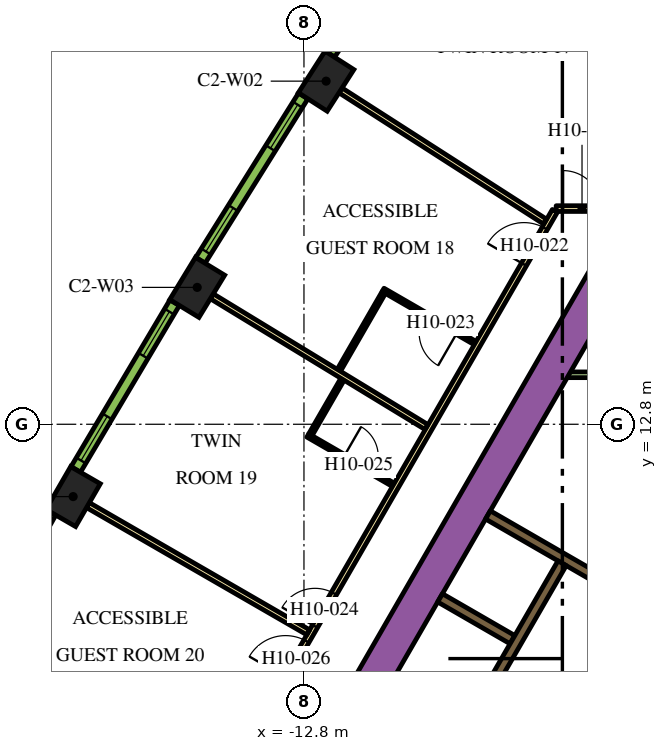
"""IFC4 building model, lengths in metres.
Left out: names, types, materials, properties, quantities, classifications, styles, units other than length and angle.
Written with IfcOpenShell. Run it as: python <this file> out.ifc"""

import sys

from ifc_helpers import new_model, si_unit, direction, frame, frame_2d, origin, origin_2d, place, context, subcontext, project, spatial, rectangle, extrude, element, fill, save


model = new_model("IFC4")
c1 = context("Model", 3, precision=1e-05, world=origin(), true_north=direction((0.0, 1.0)))
c2 = subcontext(c1, "Body", "Model", "MODEL_VIEW")
j1 = project(units=[si_unit("LENGTHUNIT", "METRE"), si_unit("PLANEANGLEUNIT", "RADIAN")], contexts=[c1])
p1 = place(None, origin())
s1 = spatial("IfcSite", under=j1, at=p1, CompositionType="ELEMENT")
p2 = place(p1, origin())
s2 = spatial("IfcBuilding", under=s1, at=p2, CompositionType="ELEMENT")
p3 = place(p2, frame((0.0, 0.0, 130.5)))
s3 = spatial("IfcBuildingStorey", under=s2, at=p3, CompositionType="ELEMENT", Elevation=130.5)
for number, where, z_axis, x_axis in (
    (1, (-12.217, 21.828, 0.0), (0.0, 0.0, 1.0), (-0.54, -0.842, 0.0)),
    (2, (-15.609, 16.402, 0.0), (0.0, 0.0, 1.0), (-0.52, -0.854, 0.0)),
    (3, (-18.874, 10.897, 0.0), (0.0, 0.0, 1.0), (-0.5, -0.866, 0.0)),
):
    element("IfcColumn", number, at=place(p3, frame(where, z_axis=z_axis, x_axis=x_axis)), inside=s3, PredefinedType="COLUMN", context=c2, shape_type="SweptSolid", body=[
        extrude(rectangle(XDim=1.3, YDim=0.9, at=origin_2d()), origin(), (0.0, 0.0, 1.0), 3.9),
    ])
p4 = place(p3, frame((-14.268, 0.387, 0.0), z_axis=(0.0, 0.0, 1.0), x_axis=(0.499994617707, 0.866028511231, 0.0)))
e4 = element("IfcWall", 4, at=p4, inside=s3, PredefinedType="SOLIDWALL", context=c2, shape_type="SweptSolid", body=[
    extrude(rectangle(XDim=18.817, YDim=0.9, at=frame_2d((9.409, 0.0))), origin(), (0.0, 0.0, 1.0), 3.9),
])
p5 = place(p3, frame((-8.06, -1.311, 0.0), z_axis=(0.0, 0.0, 1.0), x_axis=(0.50000273126, 0.866023826885, 0.0)))
e5 = element("IfcWall", 5, at=p5, inside=s3, PredefinedType="SOLIDWALL", context=c2, shape_type="SweptSolid", body=[
    extrude(rectangle(XDim=10.33, YDim=0.25, at=frame_2d((5.165, 0.0))), origin(), (0.0, 0.0, 1.0), 3.9),
])
p6 = place(p3, frame((-7.314, 7.132, 0.0), z_axis=(0.0, 0.0, 1.0), x_axis=(-0.866008176907, 0.50002983664, 0.0)))
e6 = element("IfcWall", 6, at=p6, inside=s3, PredefinedType="SOLIDWALL", context=c2, shape_type="SweptSolid", body=[
    extrude(rectangle(XDim=2.2, YDim=0.25, at=frame_2d((1.1, 0.0))), origin(), (0.0, 0.0, 1.0), 3.9),
])
p7 = place(p3, frame((-7.959, 10.415, 0.0), z_axis=(0.0, 0.0, 1.0), x_axis=(0.866020958405, -0.500007699544, 0.0)))
e7 = element("IfcWall", 7, at=p7, inside=s3, PredefinedType="SOLIDWALL", context=c2, shape_type="SweptSolid", body=[
    extrude(rectangle(XDim=4.1, YDim=0.25, at=frame_2d((2.05, 0.0))), origin(), (0.0, 0.0, 1.0), 3.9),
])
p8 = place(p3, frame((-5.851, 14.102, 0.0), z_axis=(0.0, 0.0, 1.0), x_axis=(1.0, 0.0, 0.0)))
e8 = element("IfcWall", 8, at=p8, inside=s3, PredefinedType="PARTITIONING", context=c2, shape_type="SweptSolid", body=[
    extrude(rectangle(XDim=1.18, YDim=0.15, at=frame_2d((0.59, 0.0))), origin(), (0.0, 0.0, 1.0), 2.6),
])
p9 = place(p3, frame((-6.008, 9.144, 0.0), z_axis=(0.0, 0.0, 1.0), x_axis=(-0.500006956611, -0.866021387346, 0.0)))
e9 = element("IfcWall", 9, at=p9, inside=s3, PredefinedType="SOLIDWALL", context=c2, shape_type="SweptSolid", body=[
    extrude(rectangle(XDim=9.83, YDim=0.25, at=frame_2d((4.915, 0.0))), origin(), (0.0, 0.0, 1.0), 3.9),
])
p10 = place(p9, frame((6.985, 0.0, 0.0)))
e10 = element("IfcOpeningElement", 10, at=p10, cuts=e9, PredefinedType="OPENING", context=c2, shape_type="SweptSolid", body=[
    extrude(rectangle(XDim=0.9, YDim=2.1, at=frame_2d((0.45, 1.05))), frame((0.0, 0.135, 0.0), z_axis=(0.0, -1.0, 0.0), x_axis=(1.0, 0.0, 0.0)), (0.0, 0.0, 1.0), 0.27),
])
p11 = place(p3, frame((-6.163, 18.475, 0.0), z_axis=(0.0, 0.0, 1.0), x_axis=(1.0, 0.0, 0.0)))
e11 = element("IfcWall", 11, at=p11, inside=s3, PredefinedType="PARTITIONING", context=c2, shape_type="SweptSolid", body=[
    extrude(rectangle(XDim=5.258, YDim=0.15, at=frame_2d((2.629, 0.0))), origin(), (0.0, 0.0, 1.0), 2.6),
])
p12 = place(p11, frame((0.18, 0.0, 0.0)))
e12 = element("IfcOpeningElement", 12, at=p12, cuts=e11, PredefinedType="OPENING", context=c2, shape_type="SweptSolid", body=[
    extrude(rectangle(XDim=1.0, YDim=2.1, at=frame_2d((0.5, 1.05))), frame((0.0, 0.085, 0.0), z_axis=(0.0, -1.0, 0.0), x_axis=(1.0, 0.0, 0.0)), (0.0, 0.0, 1.0), 0.17),
])
p13 = place(p3, frame((-19.081, -3.9, 0.0), z_axis=(0.0, 0.0, 1.0), x_axis=(0.499998313975, 0.866026377209, 0.0)))
e13 = element("IfcWall", 13, at=p13, inside=s3, PredefinedType="PARTITIONING", context=c2, shape_type="SweptSolid", body=[
    extrude(rectangle(XDim=25.766, YDim=0.15, at=frame_2d((12.883, 0.0))), origin(), (0.0, 0.0, 1.0), 2.6),
])
p14 = place(p13, frame((24.141, 0.0, 0.0)))
e14 = element("IfcOpeningElement", 14, at=p14, cuts=e13, PredefinedType="OPENING", context=c2, shape_type="SweptSolid", body=[
    extrude(rectangle(XDim=1.1, YDim=2.1, at=frame_2d((0.55, 1.05))), frame((0.0, 0.085, 0.0), z_axis=(0.0, -1.0, 0.0), x_axis=(1.0, 0.0, 0.0)), (0.0, 0.0, 1.0), 0.17),
])
p15 = place(p13, frame((13.144, 0.0, 0.0)))
e15 = element("IfcOpeningElement", 15, at=p15, cuts=e13, PredefinedType="OPENING", context=c2, shape_type="SweptSolid", body=[
    extrude(rectangle(XDim=1.0, YDim=2.1, at=frame_2d((0.5, 1.05))), frame((0.0, 0.085, 0.0), z_axis=(0.0, -1.0, 0.0), x_axis=(1.0, 0.0, 0.0)), (0.0, 0.0, 1.0), 0.17),
])
p16 = place(p13, frame((11.593, 0.0, 0.0)))
e16 = element("IfcOpeningElement", 16, at=p16, cuts=e13, PredefinedType="OPENING", context=c2, shape_type="SweptSolid", body=[
    extrude(rectangle(XDim=1.1, YDim=2.1, at=frame_2d((0.55, 1.05))), frame((0.0, 0.085, 0.0), z_axis=(0.0, -1.0, 0.0), x_axis=(1.0, 0.0, 0.0)), (0.0, 0.0, 1.0), 0.17),
])
p17 = place(p13, frame((0.596, 0.0, 0.0)))
e17 = element("IfcOpeningElement", 17, at=p17, cuts=e13, PredefinedType="OPENING", context=c2, shape_type="SweptSolid", body=[
    extrude(rectangle(XDim=1.0, YDim=2.1, at=frame_2d((0.5, 1.05))), frame((0.0, 0.085, 0.0), z_axis=(0.0, -1.0, 0.0), x_axis=(1.0, 0.0, 0.0)), (0.0, 0.0, 1.0), 0.17),
])
p18 = place(p3, frame((-18.484, 10.672, 0.0), z_axis=(0.0, 0.0, 1.0), x_axis=(0.866019162053, -0.50001081084, 0.0)))
e18 = element("IfcWall", 18, at=p18, inside=s3, PredefinedType="PARTITIONING", context=c2, shape_type="SweptSolid", body=[
    extrude(rectangle(XDim=6.694, YDim=0.15, at=frame_2d((3.347, 0.0))), origin(), (0.0, 0.0, 1.0), 2.6),
])
p19 = place(p3, frame((-15.225, 16.167, 0.0), z_axis=(0.0, 0.0, 1.0), x_axis=(0.854088713274, -0.520127359266, 0.0)))
e19 = element("IfcWall", 19, at=p19, inside=s3, PredefinedType="PARTITIONING", context=c2, shape_type="SweptSolid", body=[
    extrude(rectangle(XDim=6.611, YDim=0.15, at=frame_2d((3.305, 0.0))), origin(), (0.0, 0.0, 1.0), 2.6),
])
p20 = place(p3, frame((-11.838, 21.585, 0.0), z_axis=(0.0, 0.0, 1.0), x_axis=(0.841699322813, -0.539946525108, 0.0)))
e20 = element("IfcWall", 20, at=p20, inside=s3, PredefinedType="PARTITIONING", context=c2, shape_type="SweptSolid", body=[
    extrude(rectangle(XDim=6.392, YDim=0.15, at=frame_2d((3.196, 0.0))), origin(), (0.0, 0.0, 1.0), 2.6),
])
p21 = place(p3, frame((-8.326, 26.923, 0.0), z_axis=(0.0, 0.0, 1.0), x_axis=(0.828836601893, -0.5594907393, 0.0)))
e21 = element("IfcWall", 21, at=p21, inside=s3, PredefinedType="PARTITIONING", context=c2, shape_type="SweptSolid", body=[
    extrude(rectangle(XDim=8.909, YDim=0.15, at=frame_2d((4.455, 0.0))), origin(), (0.0, 0.0, 1.0), 2.6),
])
p22 = place(p3, frame((-8.293, 14.936, 0.0), z_axis=(0.0, 0.0, 1.0), x_axis=(-0.866034573852, 0.49998411664, 0.0)))
e22 = element("IfcWall", 22, at=p22, inside=s3, PredefinedType="PARTITIONING", context=c2, shape_type="SweptSolid", body=[
    extrude(rectangle(XDim=2.8, YDim=0.1, at=frame_2d((1.4, 0.0))), origin(), (0.0, 0.0, 1.0), 2.6),
])
p23 = place(p22, frame((0.55, 0.0, 0.0)))
e23 = element("IfcOpeningElement", 23, at=p23, cuts=e22, PredefinedType="OPENING", context=c2, shape_type="SweptSolid", body=[
    extrude(rectangle(XDim=1.0, YDim=2.1, at=frame_2d((0.5, 1.05))), frame((0.0, 0.06, 0.0), z_axis=(0.0, -1.0, 0.0), x_axis=(1.0, 0.0, 0.0)), (0.0, 0.0, 1.0), 0.12),
])
p24 = place(p3, frame((-10.7, 16.267, 0.0), z_axis=(0.0, 0.0, 1.0), x_axis=(-0.500032858622, -0.866006432019, 0.0)))
e24 = element("IfcWall", 24, at=p24, inside=s3, PredefinedType="PARTITIONING", context=c2, shape_type="SweptSolid", body=[
    extrude(rectangle(XDim=2.36, YDim=0.1, at=frame_2d((1.18, 0.0))), origin(), (0.0, 0.0, 1.0), 2.6),
])
p25 = place(p3, frame((-12.698, 12.506, 0.0), z_axis=(0.0, 0.0, 1.0), x_axis=(0.865997922154, -0.500047596559, 0.0)))
e25 = element("IfcWall", 25, at=p25, inside=s3, PredefinedType="PARTITIONING", context=c2, shape_type="SweptSolid", body=[
    extrude(rectangle(XDim=2.6, YDim=0.1, at=frame_2d((1.3, 0.0))), origin(), (0.0, 0.0, 1.0), 2.6),
])
p26 = place(p25, frame((1.1, 0.0, 0.0)))
e26 = element("IfcOpeningElement", 26, at=p26, cuts=e25, PredefinedType="OPENING", context=c2, shape_type="SweptSolid", body=[
    extrude(rectangle(XDim=0.9, YDim=2.1, at=frame_2d((0.45, 1.05))), frame((0.0, 0.06, 0.0), z_axis=(0.0, -1.0, 0.0), x_axis=(1.0, 0.0, 0.0)), (0.0, 0.0, 1.0), 0.12),
])
p27 = place(p3, frame((-12.63, 12.524, 0.0), z_axis=(0.0, 0.0, 1.0), x_axis=(0.499953100966, 0.866052479261, 0.0)))
e27 = element("IfcWall", 27, at=p27, inside=s3, PredefinedType="PARTITIONING", context=c2, shape_type="SweptSolid", body=[
    extrude(rectangle(XDim=1.68, YDim=0.1, at=frame_2d((0.84, 0.0))), origin(), (0.0, 0.0, 1.0), 2.6),
])
p28 = place(p3, frame((-9.311, 26.799, 0.0), z_axis=(0.0, 0.0, 1.0), x_axis=(-0.549741341923, -0.835334937005, 0.0)))
e28 = element("IfcWall", 28, at=p28, inside=s3, PredefinedType="SOLIDWALL", context=c2, shape_type="SweptSolid", body=[
    extrude(rectangle(XDim=5.1, YDim=0.29, at=frame_2d((2.55, 0.0))), origin(), (0.0, 0.0, 1.0), 3.5),
])
p29 = place(p28, frame((0.273, 0.0, 0.9)))
e29 = element("IfcOpeningElement", 29, at=p29, cuts=e28, PredefinedType="OPENING", context=c2, shape_type="SweptSolid", body=[
    extrude(rectangle(XDim=1.35, YDim=2.15, at=frame_2d((0.675, 1.075))), frame((0.0, 0.155, 0.0), z_axis=(0.0, -1.0, 0.0), x_axis=(1.0, 0.0, 0.0)), (0.0, 0.0, 1.0), 0.31),
])
p30 = place(p28, frame((3.478, 0.0, 0.9)))
e30 = element("IfcOpeningElement", 30, at=p30, cuts=e28, PredefinedType="OPENING", context=c2, shape_type="SweptSolid", body=[
    extrude(rectangle(XDim=1.35, YDim=2.15, at=frame_2d((0.675, 1.075))), frame((0.0, 0.155, 0.0), z_axis=(0.0, -1.0, 0.0), x_axis=(1.0, 0.0, 0.0)), (0.0, 0.0, 1.0), 0.31),
])
p31 = place(p3, frame((-12.82, 21.439, 0.0), z_axis=(0.0, 0.0, 1.0), x_axis=(-0.530072082134, -0.847952585787, 0.0)))
e31 = element("IfcWall", 31, at=p31, inside=s3, PredefinedType="SOLIDWALL", context=c2, shape_type="SweptSolid", body=[
    extrude(rectangle(XDim=5.1, YDim=0.29, at=frame_2d((2.55, 0.0))), origin(), (0.0, 0.0, 1.0), 3.5),
])
p32 = place(p31, frame((0.273, 0.0, 0.9)))
e32 = element("IfcOpeningElement", 32, at=p32, cuts=e31, PredefinedType="OPENING", context=c2, shape_type="SweptSolid", body=[
    extrude(rectangle(XDim=1.35, YDim=2.15, at=frame_2d((0.675, 1.075))), frame((0.0, 0.155, 0.0), z_axis=(0.0, -1.0, 0.0), x_axis=(1.0, 0.0, 0.0)), (0.0, 0.0, 1.0), 0.31),
])
p33 = place(p31, frame((3.478, 0.0, 0.9)))
e33 = element("IfcOpeningElement", 33, at=p33, cuts=e31, PredefinedType="OPENING", context=c2, shape_type="SweptSolid", body=[
    extrude(rectangle(XDim=1.35, YDim=2.15, at=frame_2d((0.675, 1.075))), frame((0.0, 0.155, 0.0), z_axis=(0.0, -1.0, 0.0), x_axis=(1.0, 0.0, 0.0)), (0.0, 0.0, 1.0), 0.31),
])
p34 = place(p3, frame((-16.203, 15.998, 0.0), z_axis=(0.0, 0.0, 1.0), x_axis=(-0.510054281659, -0.860142214847, 0.0)))
e34 = element("IfcWall", 34, at=p34, inside=s3, PredefinedType="SOLIDWALL", context=c2, shape_type="SweptSolid", body=[
    extrude(rectangle(XDim=5.101, YDim=0.29, at=frame_2d((2.55, 0.0))), origin(), (0.0, 0.0, 1.0), 3.5),
])
p35 = place(p34, frame((0.273, 0.0, 0.9)))
e35 = element("IfcOpeningElement", 35, at=p35, cuts=e34, PredefinedType="OPENING", context=c2, shape_type="SweptSolid", body=[
    extrude(rectangle(XDim=1.35, YDim=2.15, at=frame_2d((0.675, 1.075))), frame((0.0, 0.155, 0.0), z_axis=(0.0, -1.0, 0.0), x_axis=(1.0, 0.0, 0.0)), (0.0, 0.0, 1.0), 0.31),
])
p36 = place(p34, frame((3.478, 0.0, 0.9)))
e36 = element("IfcOpeningElement", 36, at=p36, cuts=e34, PredefinedType="OPENING", context=c2, shape_type="SweptSolid", body=[
    extrude(rectangle(XDim=1.35, YDim=2.15, at=frame_2d((0.675, 1.075))), frame((0.0, 0.155, 0.0), z_axis=(0.0, -1.0, 0.0), x_axis=(1.0, 0.0, 0.0)), (0.0, 0.0, 1.0), 0.31),
])
p37 = place(p3, frame((-19.458, 10.48, 0.0), z_axis=(0.0, 0.0, 1.0), x_axis=(-0.48983164787, -0.87181704316, 0.0)))
e37 = element("IfcWall", 37, at=p37, inside=s3, PredefinedType="SOLIDWALL", context=c2, shape_type="SweptSolid", body=[
    extrude(rectangle(XDim=5.1, YDim=0.29, at=frame_2d((2.55, 0.0))), origin(), (0.0, 0.0, 1.0), 3.5),
])
p38 = place(p37, frame((0.272, 0.0, 0.9)))
e38 = element("IfcOpeningElement", 38, at=p38, cuts=e37, PredefinedType="OPENING", context=c2, shape_type="SweptSolid", body=[
    extrude(rectangle(XDim=1.35, YDim=2.15, at=frame_2d((0.675, 1.075))), frame((0.0, 0.155, 0.0), z_axis=(0.0, -1.0, 0.0), x_axis=(1.0, 0.0, 0.0)), (0.0, 0.0, 1.0), 0.31),
])
p39 = place(p37, frame((3.478, 0.0, 0.9)))
e39 = element("IfcOpeningElement", 39, at=p39, cuts=e37, PredefinedType="OPENING", context=c2, shape_type="SweptSolid", body=[
    extrude(rectangle(XDim=1.35, YDim=2.15, at=frame_2d((0.675, 1.075))), frame((0.0, 0.155, 0.0), z_axis=(0.0, -1.0, 0.0), x_axis=(1.0, 0.0, 0.0)), (0.0, 0.0, 1.0), 0.31),
])
p40 = place(p12, origin())
e40 = element("IfcDoor", 40, at=p40, inside=s3, OperationType="SINGLE_SWING_LEFT", PredefinedType="DOOR", context=c2, shape_type="SweptSolid", body=[
    extrude(rectangle(XDim=1.0, YDim=2.1, at=frame_2d((0.5, 1.05))), frame((0.0, 0.025, 0.0), z_axis=(0.0, -1.0, 0.0), x_axis=(1.0, 0.0, 0.0)), (0.0, 0.0, 1.0), 0.05),
])
fill(e12, e40)
p41 = place(p14, origin())
e41 = element("IfcDoor", 41, at=p41, inside=s3, OperationType="SINGLE_SWING_RIGHT", PredefinedType="DOOR", context=c2, shape_type="SweptSolid", body=[
    extrude(rectangle(XDim=1.1, YDim=2.1, at=frame_2d((0.55, 1.05))), frame((0.0, 0.025, 0.0), z_axis=(0.0, -1.0, 0.0), x_axis=(1.0, 0.0, 0.0)), (0.0, 0.0, 1.0), 0.05),
])
fill(e14, e41)
p42 = place(p23, origin())
e42 = element("IfcDoor", 42, at=p42, inside=s3, OperationType="SINGLE_SWING_RIGHT", PredefinedType="DOOR", context=c2, shape_type="SweptSolid", body=[
    extrude(rectangle(XDim=1.0, YDim=2.1, at=frame_2d((0.5, 1.05))), frame((0.0, 0.025, 0.0), z_axis=(0.0, -1.0, 0.0), x_axis=(1.0, 0.0, 0.0)), (0.0, 0.0, 1.0), 0.05),
])
fill(e23, e42)
p43 = place(p15, origin())
e43 = element("IfcDoor", 43, at=p43, inside=s3, OperationType="SINGLE_SWING_LEFT", PredefinedType="DOOR", context=c2, shape_type="SweptSolid", body=[
    extrude(rectangle(XDim=1.0, YDim=2.1, at=frame_2d((0.5, 1.05))), frame((0.0, 0.025, 0.0), z_axis=(0.0, -1.0, 0.0), x_axis=(1.0, 0.0, 0.0)), (0.0, 0.0, 1.0), 0.05),
])
fill(e15, e43)
p44 = place(p26, origin())
e44 = element("IfcDoor", 44, at=p44, inside=s3, OperationType="SINGLE_SWING_LEFT", PredefinedType="DOOR", context=c2, shape_type="SweptSolid", body=[
    extrude(rectangle(XDim=0.9, YDim=2.1, at=frame_2d((0.45, 1.05))), frame((0.0, 0.025, 0.0), z_axis=(0.0, -1.0, 0.0), x_axis=(1.0, 0.0, 0.0)), (0.0, 0.0, 1.0), 0.05),
])
fill(e26, e44)
p45 = place(p16, origin())
e45 = element("IfcDoor", 45, at=p45, inside=s3, OperationType="SINGLE_SWING_RIGHT", PredefinedType="DOOR", context=c2, shape_type="SweptSolid", body=[
    extrude(rectangle(XDim=1.1, YDim=2.1, at=frame_2d((0.55, 1.05))), frame((0.0, 0.025, 0.0), z_axis=(0.0, -1.0, 0.0), x_axis=(1.0, 0.0, 0.0)), (0.0, 0.0, 1.0), 0.05),
])
fill(e16, e45)
p46 = place(p32, origin())
e46 = element("IfcWindow", 46, at=p46, inside=s3, PartitioningType="DOUBLE_PANEL_VERTICAL", PredefinedType="WINDOW", context=c2, shape_type="SweptSolid", body=[
    extrude(rectangle(XDim=1.35, YDim=2.15, at=frame_2d((0.675, 1.075))), frame((0.0, 0.015, 0.0), z_axis=(0.0, -1.0, 0.0), x_axis=(1.0, 0.0, 0.0)), (0.0, 0.0, 1.0), 0.06),
])
fill(e32, e46)
p47 = place(p33, origin())
e47 = element("IfcWindow", 47, at=p47, inside=s3, PartitioningType="DOUBLE_PANEL_VERTICAL", PredefinedType="WINDOW", context=c2, shape_type="SweptSolid", body=[
    extrude(rectangle(XDim=1.35, YDim=2.15, at=frame_2d((0.675, 1.075))), frame((0.0, 0.015, 0.0), z_axis=(0.0, -1.0, 0.0), x_axis=(1.0, 0.0, 0.0)), (0.0, 0.0, 1.0), 0.06),
])
fill(e33, e47)
p48 = place(p35, origin())
e48 = element("IfcWindow", 48, at=p48, inside=s3, PartitioningType="DOUBLE_PANEL_VERTICAL", PredefinedType="WINDOW", context=c2, shape_type="SweptSolid", body=[
    extrude(rectangle(XDim=1.35, YDim=2.15, at=frame_2d((0.675, 1.075))), frame((0.0, 0.015, 0.0), z_axis=(0.0, -1.0, 0.0), x_axis=(1.0, 0.0, 0.0)), (0.0, 0.0, 1.0), 0.06),
])
fill(e35, e48)
p49 = place(p36, origin())
e49 = element("IfcWindow", 49, at=p49, inside=s3, PartitioningType="DOUBLE_PANEL_VERTICAL", PredefinedType="WINDOW", context=c2, shape_type="SweptSolid", body=[
    extrude(rectangle(XDim=1.35, YDim=2.15, at=frame_2d((0.675, 1.075))), frame((0.0, 0.015, 0.0), z_axis=(0.0, -1.0, 0.0), x_axis=(1.0, 0.0, 0.0)), (0.0, 0.0, 1.0), 0.06),
])
fill(e36, e49)
save(model, sys.argv[1])
